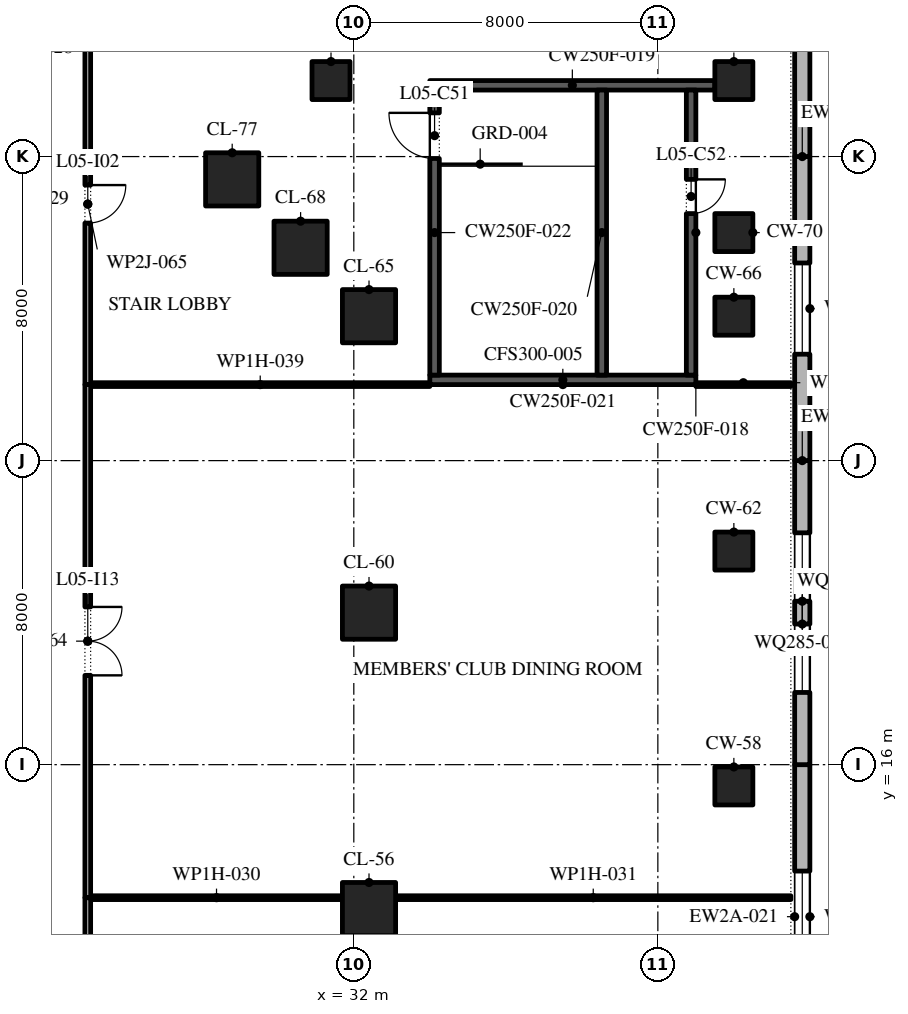
"""IFC4 building model, lengths in metres.
Left out: names, types, materials, properties, quantities, classifications, styles, units other than length and angle.
Written with IfcOpenShell. Run it as: python <this file> out.ifc"""

import sys

from ifc_helpers import new_model, si_unit, direction, frame, frame_2d, origin, origin_2d, place, context, subcontext, project, spatial, polyline, rectangle, outline, extrude, element, fill, save


model = new_model("IFC4")
c1 = context("Model", 3, precision=1e-05, world=origin(), true_north=direction((0.0, 1.0)))
c2 = subcontext(c1, "Body", "Model", "MODEL_VIEW")
j1 = project(units=[si_unit("LENGTHUNIT", "METRE"), si_unit("PLANEANGLEUNIT", "RADIAN")], contexts=[c1])
p1 = place(None, origin())
s1 = spatial("IfcSite", under=j1, at=p1, CompositionType="ELEMENT")
p2 = place(p1, origin())
s2 = spatial("IfcBuilding", under=s1, at=p2, CompositionType="ELEMENT")
p3 = place(p2, frame((0.0, 0.0, 28.8)))
s3 = spatial("IfcBuildingStorey", under=s2, at=p3, CompositionType="ELEMENT", Elevation=28.8)
p4 = place(p3, frame((32.4, 12.2, 0.0), z_axis=(0.0, 0.0, 1.0), x_axis=(1.0, 0.0, 0.0)))
e1 = element("IfcColumn", 1, at=p4, inside=s3, PredefinedType="COLUMN", context=c2, shape_type="SweptSolid", body=[
    extrude(rectangle(XDim=1.4, YDim=1.4, at=origin_2d()), origin(), (0.0, 0.0, 1.0), 4.8),
])
p5 = place(p3, frame((42.0, 15.44, 0.0), z_axis=(0.0, 0.0, 1.0), x_axis=(1.0, 0.0, 0.0)))
e2 = element("IfcColumn", 2, at=p5, inside=s3, PredefinedType="COLUMN", context=c2, shape_type="SweptSolid", body=[
    extrude(rectangle(XDim=1.0, YDim=1.0, at=origin_2d()), origin(), (0.0, 0.0, 1.0), 4.35),
])
p6 = place(p3, frame((32.4, 20.0, 0.0), z_axis=(0.0, 0.0, 1.0), x_axis=(1.0, 0.0, 0.0)))
e3 = element("IfcColumn", 3, at=p6, inside=s3, PredefinedType="COLUMN", context=c2, shape_type="SweptSolid", body=[
    extrude(rectangle(XDim=1.4, YDim=1.4, at=origin_2d()), origin(), (0.0, 0.0, 1.0), 4.8),
])
p7 = place(p3, frame((42.0, 21.62, 0.0), z_axis=(0.0, 0.0, 1.0), x_axis=(1.0, 0.0, 0.0)))
e4 = element("IfcColumn", 4, at=p7, inside=s3, PredefinedType="COLUMN", context=c2, shape_type="SweptSolid", body=[
    extrude(rectangle(XDim=1.0, YDim=1.0, at=origin_2d()), origin(), (0.0, 0.0, 1.0), 4.35),
])
p8 = place(p3, frame((32.4, 27.8, 0.0), z_axis=(0.0, 0.0, 1.0), x_axis=(1.0, 0.0, 0.0)))
e5 = element("IfcColumn", 5, at=p8, inside=s3, PredefinedType="COLUMN", context=c2, shape_type="SweptSolid", body=[
    extrude(rectangle(XDim=1.4, YDim=1.4, at=origin_2d()), origin(), (0.0, 0.0, 1.0), 4.8),
])
p9 = place(p3, frame((42.0, 27.8, 0.0), z_axis=(0.0, 0.0, 1.0), x_axis=(1.0, 0.0, 0.0)))
e6 = element("IfcColumn", 6, at=p9, inside=s3, PredefinedType="COLUMN", context=c2, shape_type="SweptSolid", body=[
    extrude(rectangle(XDim=1.0, YDim=1.0, at=origin_2d()), origin(), (0.0, 0.0, 1.0), 4.35),
])
p10 = place(p3, frame((30.6, 29.6, 0.0), z_axis=(0.0, 0.0, 1.0), x_axis=(1.0, 0.0, 0.0)))
e7 = element("IfcColumn", 7, at=p10, inside=s3, PredefinedType="COLUMN", context=c2, shape_type="SweptSolid", body=[
    extrude(rectangle(XDim=1.4, YDim=1.4, at=origin_2d()), origin(), (0.0, 0.0, 1.0), 4.8),
])
p11 = place(p3, frame((42.0, 30.0, 0.0), z_axis=(0.0, 0.0, 1.0), x_axis=(1.0, 0.0, 0.0)))
e8 = element("IfcColumn", 8, at=p11, inside=s3, PredefinedType="COLUMN", context=c2, shape_type="SweptSolid", body=[
    extrude(rectangle(XDim=1.0, YDim=1.0, at=origin_2d()), origin(), (0.0, 0.0, 1.0), 4.35),
])
p12 = place(p3, frame((28.8, 31.4, 0.0), z_axis=(0.0, 0.0, 1.0), x_axis=(1.0, 0.0, 0.0)))
e9 = element("IfcColumn", 9, at=p12, inside=s3, PredefinedType="COLUMN", context=c2, shape_type="SweptSolid", body=[
    extrude(rectangle(XDim=1.4, YDim=1.4, at=origin_2d()), origin(), (0.0, 0.0, 1.0), 4.8),
])
for number, where, z_axis, x_axis in (
    (10, (31.4, 34.0, 0.0), (0.0, 0.0, 1.0), (1.0, 0.0, 0.0)),
    (11, (42.0, 34.0, 0.0), (0.0, 0.0, 1.0), (1.0, 0.0, 0.0)),
):
    element("IfcColumn", number, at=place(p3, frame(where, z_axis=z_axis, x_axis=x_axis)), inside=s3, PredefinedType="COLUMN", context=c2, shape_type="SweptSolid", body=[
        extrude(rectangle(XDim=1.0, YDim=1.0, at=origin_2d()), origin(), (0.0, 0.0, 1.0), 4.35),
    ])
p13 = place(p3, frame((43.8, 8.0, 0.0), z_axis=(0.0, 0.0, 1.0), x_axis=(0.0, 1.0, 0.0)))
e12 = element("IfcWall", 12, at=p13, inside=s3, PredefinedType="STANDARD", context=c2, shape_type="SweptSolid", body=[
    extrude(rectangle(XDim=8.0, YDim=0.4, at=frame_2d((4.0, 0.0))), origin(), (0.0, 0.0, 1.0), 4.35),
])
p14 = place(p13, frame((2.8, 0.0, 0.9)))
e13 = element("IfcOpeningElement", 13, at=p14, cuts=e12, PredefinedType="OPENING", context=c2, shape_type="SweptSolid", body=[
    extrude(outline(polyline([(0.0, 0.0), (2.4, 0.0), (2.4, 1.425), (2.378, 1.677), (2.312, 1.921), (2.205, 2.15), (2.06, 2.356), (1.881, 2.535), (1.674, 2.679), (1.444, 2.785), (1.2, 2.85), (0.956, 2.785), (0.726, 2.679), (0.519, 2.535), (0.34, 2.356), (0.195, 2.15), (0.088, 1.921), (0.022, 1.677), (0.0, 1.425), (0.0, 0.0)])), frame((0.0, 0.21, 0.0), z_axis=(0.0, -1.0, 0.0), x_axis=(1.0, 0.0, 0.0)), (0.0, 0.0, 1.0), 0.42),
])
p15 = place(p3, frame((43.8, 16.0, 0.0), z_axis=(0.0, 0.0, 1.0), x_axis=(0.0, 1.0, 0.0)))
e14 = element("IfcWall", 14, at=p15, inside=s3, PredefinedType="STANDARD", context=c2, shape_type="SweptSolid", body=[
    extrude(rectangle(XDim=8.0, YDim=0.4, at=frame_2d((4.0, 0.0))), origin(), (0.0, 0.0, 1.0), 4.35),
])
p16 = place(p15, frame((1.9, 0.0, 0.9)))
e15 = element("IfcOpeningElement", 15, at=p16, cuts=e14, PredefinedType="OPENING", context=c2, shape_type="SweptSolid", body=[
    extrude(outline(polyline([(0.0, 0.0), (1.8, 0.0), (1.8, 1.425), (1.784, 1.646), (1.738, 1.864), (1.661, 2.072), (1.556, 2.268), (1.425, 2.447), (1.269, 2.605), (1.093, 2.741), (0.9, 2.85), (0.707, 2.741), (0.531, 2.605), (0.375, 2.447), (0.244, 2.268), (0.139, 2.072), (0.062, 1.864), (0.016, 1.646), (0.0, 1.425), (0.0, 0.0)])), frame((0.0, 0.21, 0.0), z_axis=(0.0, -1.0, 0.0), x_axis=(1.0, 0.0, 0.0)), (0.0, 0.0, 1.0), 0.42),
])
p17 = place(p15, frame((4.3, 0.0, 0.9)))
e16 = element("IfcOpeningElement", 16, at=p17, cuts=e14, PredefinedType="OPENING", context=c2, shape_type="SweptSolid", body=[
    extrude(outline(polyline([(0.0, 0.0), (1.8, 0.0), (1.8, 1.425), (1.784, 1.646), (1.738, 1.864), (1.661, 2.072), (1.556, 2.268), (1.425, 2.447), (1.269, 2.605), (1.093, 2.741), (0.9, 2.85), (0.707, 2.741), (0.531, 2.605), (0.375, 2.447), (0.244, 2.268), (0.139, 2.072), (0.062, 1.864), (0.016, 1.646), (0.0, 1.425), (0.0, 0.0)])), frame((0.0, 0.21, 0.0), z_axis=(0.0, -1.0, 0.0), x_axis=(1.0, 0.0, 0.0)), (0.0, 0.0, 1.0), 0.42),
])
p18 = place(p3, frame((43.8, 24.0, 0.0), z_axis=(0.0, 0.0, 1.0), x_axis=(0.0, 1.0, 0.0)))
e17 = element("IfcWall", 17, at=p18, inside=s3, PredefinedType="STANDARD", context=c2, shape_type="SweptSolid", body=[
    extrude(rectangle(XDim=8.0, YDim=0.4, at=frame_2d((4.0, 0.0))), origin(), (0.0, 0.0, 1.0), 4.35),
])
p19 = place(p18, frame((2.8, 0.0, 0.9)))
e18 = element("IfcOpeningElement", 18, at=p19, cuts=e17, PredefinedType="OPENING", context=c2, shape_type="SweptSolid", body=[
    extrude(outline(polyline([(0.0, 0.0), (2.4, 0.0), (2.4, 1.425), (2.378, 1.677), (2.312, 1.921), (2.205, 2.15), (2.06, 2.356), (1.881, 2.535), (1.674, 2.679), (1.444, 2.785), (1.2, 2.85), (0.956, 2.785), (0.726, 2.679), (0.519, 2.535), (0.34, 2.356), (0.195, 2.15), (0.088, 1.921), (0.022, 1.677), (0.0, 1.425), (0.0, 0.0)])), frame((0.0, 0.21, 0.0), z_axis=(0.0, -1.0, 0.0), x_axis=(1.0, 0.0, 0.0)), (0.0, 0.0, 1.0), 0.42),
])
p20 = place(p3, frame((43.8, 32.0, 0.0), z_axis=(0.0, 0.0, 1.0), x_axis=(0.0, 1.0, 0.0)))
e19 = element("IfcWall", 19, at=p20, inside=s3, PredefinedType="STANDARD", context=c2, shape_type="SweptSolid", body=[
    extrude(rectangle(XDim=4.0, YDim=0.4, at=frame_2d((2.0, 0.0))), origin(), (0.0, 0.0, 1.0), 4.35),
])
p21 = place(p3, frame((34.0, 26.125, 0.0), z_axis=(0.0, 0.0, 1.0), x_axis=(1.0, 0.0, 0.0)))
e20 = element("IfcWall", 20, at=p21, inside=s3, PredefinedType="SHEAR", context=c2, shape_type="SweptSolid", body=[
    extrude(rectangle(XDim=7.0, YDim=0.25, at=frame_2d((3.5, 0.0))), origin(), (0.0, 0.0, 1.0), 4.35),
])
p22 = place(p3, frame((34.0, 33.875, 0.0), z_axis=(0.0, 0.0, 1.0), x_axis=(1.0, 0.0, 0.0)))
e21 = element("IfcWall", 21, at=p22, inside=s3, PredefinedType="SHEAR", context=c2, shape_type="SweptSolid", body=[
    extrude(rectangle(XDim=7.5, YDim=0.25, at=frame_2d((3.75, 0.0))), origin(), (0.0, 0.0, 1.0), 4.35),
])
p23 = place(p3, frame((34.125, 26.25, 0.0), z_axis=(0.0, 0.0, 1.0), x_axis=(0.0, 1.0, 0.0)))
e22 = element("IfcWall", 22, at=p23, inside=s3, PredefinedType="SHEAR", context=c2, shape_type="SweptSolid", body=[
    extrude(rectangle(XDim=7.5, YDim=0.25, at=frame_2d((3.75, 0.0))), origin(), (0.0, 0.0, 1.0), 4.35),
])
p24 = place(p23, frame((5.7, 0.0, 0.0)))
e23 = element("IfcOpeningElement", 23, at=p24, cuts=e22, PredefinedType="OPENING", context=c2, shape_type="SweptSolid", body=[
    extrude(rectangle(XDim=1.2, YDim=2.1, at=frame_2d((0.6, 1.05))), frame((0.0, 0.135, 0.0), z_axis=(0.0, -1.0, 0.0), x_axis=(1.0, 0.0, 0.0)), (0.0, 0.0, 1.0), 0.27),
])
p25 = place(p3, frame((40.875, 26.25, 0.0), z_axis=(0.0, 0.0, 1.0), x_axis=(0.0, 1.0, 0.0)))
e24 = element("IfcWall", 24, at=p25, inside=s3, PredefinedType="SHEAR", context=c2, shape_type="SweptSolid", body=[
    extrude(rectangle(XDim=7.5, YDim=0.25, at=frame_2d((3.75, 0.0))), origin(), (0.0, 0.0, 1.0), 4.35),
])
p26 = place(p25, frame((4.25, 0.0, 0.0)))
e25 = element("IfcOpeningElement", 25, at=p26, cuts=e24, PredefinedType="OPENING", context=c2, shape_type="SweptSolid", body=[
    extrude(rectangle(XDim=0.9, YDim=2.1, at=frame_2d((0.45, 1.05))), frame((0.0, 0.135, 0.0), z_axis=(0.0, -1.0, 0.0), x_axis=(1.0, 0.0, 0.0)), (0.0, 0.0, 1.0), 0.27),
])
p27 = place(p3, frame((38.525, 26.25, 0.0), z_axis=(0.0, 0.0, 1.0), x_axis=(0.0, 1.0, 0.0)))
e26 = element("IfcWall", 26, at=p27, inside=s3, PredefinedType="SHEAR", context=c2, shape_type="SweptSolid", body=[
    extrude(rectangle(XDim=7.5, YDim=0.25, at=frame_2d((3.75, 0.0))), origin(), (0.0, 0.0, 1.0), 4.35),
])
p28 = place(p3, frame((25.075, 12.5, 0.0), z_axis=(0.0, 0.0, 1.0), x_axis=(1.0, 0.0, 0.0)))
e27 = element("IfcWall", 27, at=p28, inside=s3, PredefinedType="PARTITIONING", context=c2, shape_type="SweptSolid", body=[
    extrude(rectangle(XDim=6.625, YDim=0.1, at=frame_2d((3.312, 0.0))), origin(), (0.0, 0.0, 1.0), 4.35),
])
p29 = place(p3, frame((33.1, 12.5, 0.0), z_axis=(0.0, 0.0, 1.0), x_axis=(1.0, 0.0, 0.0)))
e28 = element("IfcWall", 28, at=p29, inside=s3, PredefinedType="PARTITIONING", context=c2, shape_type="SweptSolid", body=[
    extrude(rectangle(XDim=10.4, YDim=0.1, at=frame_2d((5.2, 0.0))), origin(), (0.0, 0.0, 1.0), 4.35),
])
p30 = place(p3, frame((25.075, 26.0, 0.0), z_axis=(0.0, 0.0, 1.0), x_axis=(1.0, 0.0, 0.0)))
e29 = element("IfcWall", 29, at=p30, inside=s3, PredefinedType="PARTITIONING", context=c2, shape_type="SweptSolid", body=[
    extrude(rectangle(XDim=8.925, YDim=0.1, at=frame_2d((4.462, 0.0))), origin(), (0.0, 0.0, 1.0), 4.35),
])
p31 = place(p3, frame((41.0, 26.0, 0.0), z_axis=(0.0, 0.0, 1.0), x_axis=(1.0, 0.0, 0.0)))
e30 = element("IfcWall", 30, at=p31, inside=s3, PredefinedType="PARTITIONING", context=c2, shape_type="SweptSolid", body=[
    extrude(rectangle(XDim=2.5, YDim=0.1, at=frame_2d((1.25, 0.0))), origin(), (0.0, 0.0, 1.0), 4.35),
])
p32 = place(p3, frame((25.0, 1.5, 0.0), z_axis=(0.0, 0.0, 1.0), x_axis=(0.0, 1.0, 0.0)))
e31 = element("IfcWall", 31, at=p32, inside=s3, PredefinedType="PARTITIONING", context=c2, shape_type="SweptSolid", body=[
    extrude(rectangle(XDim=11.0, YDim=0.15, at=frame_2d((5.5, 0.0))), origin(), (0.0, 0.0, 1.0), 4.35),
])
p33 = place(p32, frame((4.6, 0.0, 0.0)))
e32 = element("IfcOpeningElement", 32, at=p33, cuts=e31, PredefinedType="OPENING", context=c2, shape_type="SweptSolid", body=[
    extrude(rectangle(XDim=1.8, YDim=2.1, at=frame_2d((0.9, 1.05))), frame((0.0, 0.085, 0.0), z_axis=(0.0, -1.0, 0.0), x_axis=(1.0, 0.0, 0.0)), (0.0, 0.0, 1.0), 0.17),
])
p34 = place(p3, frame((25.0, 12.5, 0.0), z_axis=(0.0, 0.0, 1.0), x_axis=(0.0, 1.0, 0.0)))
e33 = element("IfcWall", 33, at=p34, inside=s3, PredefinedType="PARTITIONING", context=c2, shape_type="SweptSolid", body=[
    extrude(rectangle(XDim=13.5, YDim=0.15, at=frame_2d((6.75, 0.0))), origin(), (0.0, 0.0, 1.0), 4.35),
])
p35 = place(p34, frame((5.85, 0.0, 0.0)))
e34 = element("IfcOpeningElement", 34, at=p35, cuts=e33, PredefinedType="OPENING", context=c2, shape_type="SweptSolid", body=[
    extrude(rectangle(XDim=1.8, YDim=2.1, at=frame_2d((0.9, 1.05))), frame((0.0, 0.085, 0.0), z_axis=(0.0, -1.0, 0.0), x_axis=(1.0, 0.0, 0.0)), (0.0, 0.0, 1.0), 0.17),
])
p36 = place(p3, frame((25.0, 26.0, 0.0), z_axis=(0.0, 0.0, 1.0), x_axis=(0.0, 1.0, 0.0)))
e35 = element("IfcWall", 35, at=p36, inside=s3, PredefinedType="PARTITIONING", context=c2, shape_type="SweptSolid", body=[
    extrude(rectangle(XDim=9.5, YDim=0.15, at=frame_2d((4.75, 0.0))), origin(), (0.0, 0.0, 1.0), 4.35),
])
p37 = place(p36, frame((4.25, 0.0, 0.0)))
e36 = element("IfcOpeningElement", 36, at=p37, cuts=e35, PredefinedType="OPENING", context=c2, shape_type="SweptSolid", body=[
    extrude(rectangle(XDim=1.0, YDim=2.1, at=frame_2d((0.5, 1.05))), frame((0.0, 0.085, 0.0), z_axis=(0.0, -1.0, 0.0), x_axis=(1.0, 0.0, 0.0)), (0.0, 0.0, 1.0), 0.17),
])
p38 = place(p14, origin())
e37 = element("IfcWindow", 37, at=p38, inside=s3, PartitioningType="DOUBLE_PANEL_VERTICAL", PredefinedType="WINDOW", context=c2, shape_type="SweptSolid", body=[
    extrude(outline(polyline([(0.0, 0.0), (2.4, 0.0), (2.4, 1.425), (2.378, 1.677), (2.312, 1.921), (2.205, 2.15), (2.06, 2.356), (1.881, 2.535), (1.674, 2.679), (1.444, 2.785), (1.2, 2.85), (0.956, 2.785), (0.726, 2.679), (0.519, 2.535), (0.34, 2.356), (0.195, 2.15), (0.088, 1.921), (0.022, 1.677), (0.0, 1.425), (0.0, 0.0)])), frame((0.0, 0.03, 0.0), z_axis=(0.0, -1.0, 0.0), x_axis=(1.0, 0.0, 0.0)), (0.0, 0.0, 1.0), 0.06),
])
fill(e13, e37)
p39 = place(p16, origin())
e38 = element("IfcWindow", 38, at=p39, inside=s3, PartitioningType="DOUBLE_PANEL_VERTICAL", PredefinedType="WINDOW", context=c2, shape_type="SweptSolid", body=[
    extrude(outline(polyline([(0.0, 0.0), (1.8, 0.0), (1.8, 1.425), (1.784, 1.646), (1.738, 1.864), (1.661, 2.072), (1.556, 2.268), (1.425, 2.447), (1.269, 2.605), (1.093, 2.741), (0.9, 2.85), (0.707, 2.741), (0.531, 2.605), (0.375, 2.447), (0.244, 2.268), (0.139, 2.072), (0.062, 1.864), (0.016, 1.646), (0.0, 1.425), (0.0, 0.0)])), frame((0.0, 0.03, 0.0), z_axis=(0.0, -1.0, 0.0), x_axis=(1.0, 0.0, 0.0)), (0.0, 0.0, 1.0), 0.06),
])
fill(e15, e38)
p40 = place(p17, origin())
e39 = element("IfcWindow", 39, at=p40, inside=s3, PartitioningType="DOUBLE_PANEL_VERTICAL", PredefinedType="WINDOW", context=c2, shape_type="SweptSolid", body=[
    extrude(outline(polyline([(0.0, 0.0), (1.8, 0.0), (1.8, 1.425), (1.784, 1.646), (1.738, 1.864), (1.661, 2.072), (1.556, 2.268), (1.425, 2.447), (1.269, 2.605), (1.093, 2.741), (0.9, 2.85), (0.707, 2.741), (0.531, 2.605), (0.375, 2.447), (0.244, 2.268), (0.139, 2.072), (0.062, 1.864), (0.016, 1.646), (0.0, 1.425), (0.0, 0.0)])), frame((0.0, 0.03, 0.0), z_axis=(0.0, -1.0, 0.0), x_axis=(1.0, 0.0, 0.0)), (0.0, 0.0, 1.0), 0.06),
])
fill(e16, e39)
p41 = place(p19, origin())
e40 = element("IfcWindow", 40, at=p41, inside=s3, PartitioningType="DOUBLE_PANEL_VERTICAL", PredefinedType="WINDOW", context=c2, shape_type="SweptSolid", body=[
    extrude(outline(polyline([(0.0, 0.0), (2.4, 0.0), (2.4, 1.425), (2.378, 1.677), (2.312, 1.921), (2.205, 2.15), (2.06, 2.356), (1.881, 2.535), (1.674, 2.679), (1.444, 2.785), (1.2, 2.85), (0.956, 2.785), (0.726, 2.679), (0.519, 2.535), (0.34, 2.356), (0.195, 2.15), (0.088, 1.921), (0.022, 1.677), (0.0, 1.425), (0.0, 0.0)])), frame((0.0, 0.03, 0.0), z_axis=(0.0, -1.0, 0.0), x_axis=(1.0, 0.0, 0.0)), (0.0, 0.0, 1.0), 0.06),
])
fill(e18, e40)
p42 = place(p24, origin())
e41 = element("IfcDoor", 41, at=p42, inside=s3, OperationType="SINGLE_SWING_LEFT", PredefinedType="DOOR", context=c2, shape_type="SweptSolid", body=[
    extrude(rectangle(XDim=1.2, YDim=2.1, at=frame_2d((0.6, 1.05))), frame((0.0, 0.025, 0.0), z_axis=(0.0, -1.0, 0.0), x_axis=(1.0, 0.0, 0.0)), (0.0, 0.0, 1.0), 0.05),
])
fill(e23, e41)
p43 = place(p26, frame((0.9, 0.2, 0.0), z_axis=(0.0, 0.0, 1.0), x_axis=(-1.0, 0.0, 0.0)))
e42 = element("IfcDoor", 42, at=p43, inside=s3, OperationType="SINGLE_SWING_RIGHT", PredefinedType="DOOR", context=c2, shape_type="SweptSolid", body=[
    extrude(rectangle(XDim=0.9, YDim=2.1, at=frame_2d((0.45, 1.05))), frame((0.0, 0.125, 0.0), z_axis=(0.0, -1.0, 0.0), x_axis=(1.0, 0.0, 0.0)), (0.0, 0.0, 1.0), 0.05),
])
fill(e25, e42)
p44 = place(p37, frame((1.0, 0.0, 0.0), z_axis=(0.0, 0.0, 1.0), x_axis=(-1.0, 0.0, 0.0)))
e43 = element("IfcDoor", 43, at=p44, inside=s3, OperationType="SINGLE_SWING_RIGHT", PredefinedType="DOOR", context=c2, shape_type="SweptSolid", body=[
    extrude(rectangle(XDim=1.0, YDim=2.1, at=frame_2d((0.5, 1.05))), frame((0.0, 0.025, 0.0), z_axis=(0.0, -1.0, 0.0), x_axis=(1.0, 0.0, 0.0)), (0.0, 0.0, 1.0), 0.05),
])
fill(e36, e43)
p45 = place(p35, frame((1.8, 0.0, 0.0), z_axis=(0.0, 0.0, 1.0), x_axis=(-1.0, 0.0, 0.0)))
e44 = element("IfcDoor", 44, at=p45, inside=s3, OperationType="SINGLE_SWING_LEFT", PredefinedType="DOOR", context=c2, shape_type="SweptSolid", body=[
    extrude(rectangle(XDim=1.8, YDim=2.1, at=frame_2d((0.9, 1.05))), frame((0.0, 0.025, 0.0), z_axis=(0.0, -1.0, 0.0), x_axis=(1.0, 0.0, 0.0)), (0.0, 0.0, 1.0), 0.05),
])
fill(e34, e44)
save(model, sys.argv[1])
